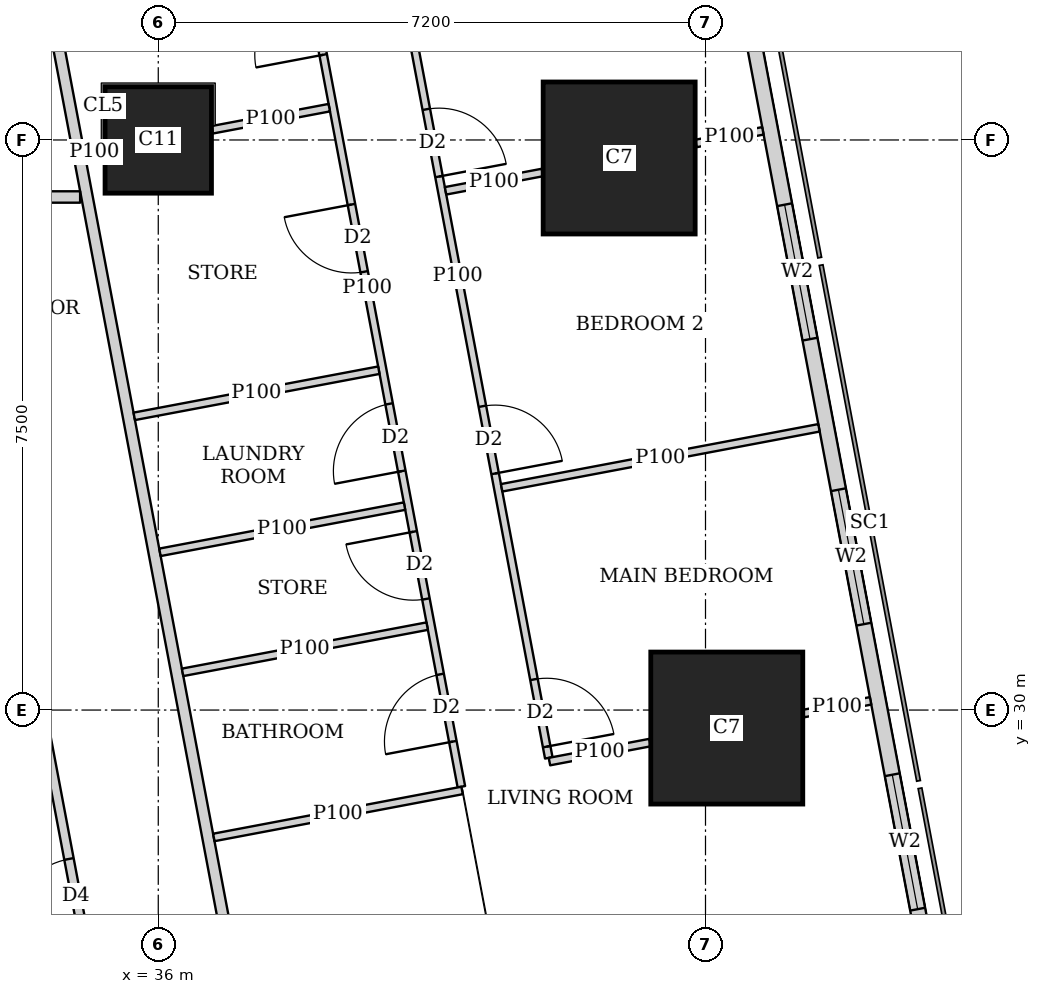
"""IFC4 building model, lengths in metres.
Left out: names, types, materials, properties, quantities, classifications, styles, units other than length and angle.
Written with IfcOpenShell. Run it as: python <this file> out.ifc"""

import sys

from ifc_helpers import new_model, si_unit, direction, frame, frame_2d, origin, origin_2d, place, context, subcontext, project, spatial, rectangle, extrude, element, fill, save


model = new_model("IFC4")
c1 = context("Model", 3, precision=1e-05, world=origin(), true_north=direction((0.0, 1.0)))
c2 = subcontext(c1, "Body", "Model", "MODEL_VIEW")
j1 = project(units=[si_unit("LENGTHUNIT", "METRE"), si_unit("PLANEANGLEUNIT", "RADIAN")], contexts=[c1])
p1 = place(None, origin())
s1 = spatial("IfcSite", under=j1, at=p1, CompositionType="ELEMENT")
p2 = place(p1, origin())
s2 = spatial("IfcBuilding", under=s1, at=p2, CompositionType="ELEMENT")
p3 = place(p2, frame((0.0, 0.0, 270.35)))
s3 = spatial("IfcBuildingStorey", under=s2, at=p3, CompositionType="ELEMENT", Elevation=270.35)
p4 = place(p3, frame((43.48, 29.763, 0.0), z_axis=(0.0, 0.0, 1.0), x_axis=(1.0, 0.0, 0.0)))
e1 = element("IfcColumn", 1, at=p4, inside=s3, PredefinedType="COLUMN", context=c2, shape_type="SweptSolid", body=[
    extrude(rectangle(XDim=2.0, YDim=2.0, at=origin_2d()), origin(), (0.0, 0.0, 1.0), 3.75),
])
p5 = place(p3, frame((36.0, 37.5, 0.0), z_axis=(0.0, 0.0, 1.0), x_axis=(1.0, 0.0, 0.0)))
e2 = element("IfcColumn", 2, at=p5, inside=s3, PredefinedType="COLUMN", context=c2, shape_type="SweptSolid", body=[
    extrude(rectangle(XDim=1.4, YDim=1.4, at=origin_2d()), origin(), (0.0, 0.0, 1.0), 3.75),
])
p6 = place(p3, frame((42.064, 37.263, 0.0), z_axis=(0.0, 0.0, 1.0), x_axis=(1.0, 0.0, 0.0)))
e3 = element("IfcColumn", 3, at=p6, inside=s3, PredefinedType="COLUMN", context=c2, shape_type="SweptSolid", body=[
    extrude(rectangle(XDim=2.0, YDim=2.0, at=origin_2d()), origin(), (0.0, 0.0, 1.0), 3.75),
])
p7 = place(p3, frame((49.684, 7.832, 0.0), z_axis=(0.0, 0.0, 1.0), x_axis=(-0.185616669694, 0.982622232565, 0.0)))
e4 = element("IfcWall", 4, at=p7, inside=s3, PredefinedType="SOLIDWALL", context=c2, shape_type="SweptSolid", body=[
    extrude(rectangle(XDim=36.0, YDim=0.2, at=frame_2d((18.0, 0.0))), origin(), (0.0, 0.0, 1.0), 3.5),
])
p8 = place(p7, frame((2.518, 0.0, 0.9)))
e5 = element("IfcOpeningElement", 5, at=p8, cuts=e4, PredefinedType="OPENING", context=c2, shape_type="SweptSolid", body=[
    extrude(rectangle(XDim=2.4, YDim=1.5, at=frame_2d((1.2, 0.75))), frame((0.0, 0.11, 0.0), z_axis=(0.0, -1.0, 0.0), x_axis=(1.0, 0.0, 0.0)), (0.0, 0.0, 1.0), 0.22),
])
p9 = place(p7, frame((8.444, 0.0, 0.9)))
e6 = element("IfcOpeningElement", 6, at=p9, cuts=e4, PredefinedType="OPENING", context=c2, shape_type="SweptSolid", body=[
    extrude(rectangle(XDim=1.8, YDim=1.5, at=frame_2d((0.9, 0.75))), frame((0.0, 0.11, 0.0), z_axis=(0.0, -1.0, 0.0), x_axis=(1.0, 0.0, 0.0)), (0.0, 0.0, 1.0), 0.22),
])
p10 = place(p7, frame((12.261, 0.0, 0.9)))
e7 = element("IfcOpeningElement", 7, at=p10, cuts=e4, PredefinedType="OPENING", context=c2, shape_type="SweptSolid", body=[
    extrude(rectangle(XDim=1.8, YDim=1.5, at=frame_2d((0.9, 0.75))), frame((0.0, 0.11, 0.0), z_axis=(0.0, -1.0, 0.0), x_axis=(1.0, 0.0, 0.0)), (0.0, 0.0, 1.0), 0.22),
])
p11 = place(p7, frame((16.078, 0.0, 0.9)))
e8 = element("IfcOpeningElement", 8, at=p11, cuts=e4, PredefinedType="OPENING", context=c2, shape_type="SweptSolid", body=[
    extrude(rectangle(XDim=1.8, YDim=1.5, at=frame_2d((0.9, 0.75))), frame((0.0, 0.11, 0.0), z_axis=(0.0, -1.0, 0.0), x_axis=(1.0, 0.0, 0.0)), (0.0, 0.0, 1.0), 0.22),
])
p12 = place(p7, frame((19.894, 0.0, 0.9)))
e9 = element("IfcOpeningElement", 9, at=p12, cuts=e4, PredefinedType="OPENING", context=c2, shape_type="SweptSolid", body=[
    extrude(rectangle(XDim=1.8, YDim=1.5, at=frame_2d((0.9, 0.75))), frame((0.0, 0.11, 0.0), z_axis=(0.0, -1.0, 0.0), x_axis=(1.0, 0.0, 0.0)), (0.0, 0.0, 1.0), 0.22),
])
p13 = place(p7, frame((23.71, 0.0, 0.9)))
e10 = element("IfcOpeningElement", 10, at=p13, cuts=e4, PredefinedType="OPENING", context=c2, shape_type="SweptSolid", body=[
    extrude(rectangle(XDim=1.8, YDim=1.5, at=frame_2d((0.9, 0.75))), frame((0.0, 0.11, 0.0), z_axis=(0.0, -1.0, 0.0), x_axis=(1.0, 0.0, 0.0)), (0.0, 0.0, 1.0), 0.22),
])
p14 = place(p7, frame((27.526, 0.0, 0.9)))
e11 = element("IfcOpeningElement", 11, at=p14, cuts=e4, PredefinedType="OPENING", context=c2, shape_type="SweptSolid", body=[
    extrude(rectangle(XDim=1.8, YDim=1.5, at=frame_2d((0.9, 0.75))), frame((0.0, 0.11, 0.0), z_axis=(0.0, -1.0, 0.0), x_axis=(1.0, 0.0, 0.0)), (0.0, 0.0, 1.0), 0.22),
])
p15 = place(p7, frame((32.046, 0.0, 0.9)))
e12 = element("IfcOpeningElement", 12, at=p15, cuts=e4, PredefinedType="OPENING", context=c2, shape_type="SweptSolid", body=[
    extrude(rectangle(XDim=1.8, YDim=1.5, at=frame_2d((0.9, 0.75))), frame((0.0, 0.11, 0.0), z_axis=(0.0, -1.0, 0.0), x_axis=(1.0, 0.0, 0.0)), (0.0, 0.0, 1.0), 0.22),
])
p16 = place(p3, frame((29.501, 36.75, 0.0), z_axis=(0.0, 0.0, 1.0), x_axis=(1.0, 0.0, 0.0)))
e13 = element("IfcWall", 13, at=p16, inside=s3, PredefinedType="SOLIDWALL", context=c2, shape_type="SweptSolid", body=[
    extrude(rectangle(XDim=5.471, YDim=0.15, at=frame_2d((2.735, 0.0))), origin(), (0.0, 0.0, 1.0), 3.5),
])
p17 = place(p3, frame((34.036, 42.186, 0.0), z_axis=(0.0, 0.0, 1.0), x_axis=(0.185593518645, -0.9826266055, 0.0)))
e14 = element("IfcWall", 14, at=p17, inside=s3, PredefinedType="SOLIDWALL", context=c2, shape_type="SweptSolid", body=[
    extrude(rectangle(XDim=35.961, YDim=0.15, at=frame_2d((17.98, 0.0))), origin(), (0.0, 0.0, 1.0), 2.5),
])
p18 = place(p17, frame((15.529, 0.0, 0.0)))
e15 = element("IfcOpeningElement", 15, at=p18, cuts=e14, PredefinedType="OPENING", context=c2, shape_type="SweptSolid", body=[
    extrude(rectangle(XDim=1.0, YDim=2.1, at=frame_2d((0.5, 1.05))), frame((0.0, 0.085, 0.0), z_axis=(0.0, -1.0, 0.0), x_axis=(1.0, 0.0, 0.0)), (0.0, 0.0, 1.0), 0.17),
])
p19 = place(p17, frame((19.345, 0.0, 0.0)))
e16 = element("IfcOpeningElement", 16, at=p19, cuts=e14, PredefinedType="OPENING", context=c2, shape_type="SweptSolid", body=[
    extrude(rectangle(XDim=1.0, YDim=2.1, at=frame_2d((0.5, 1.05))), frame((0.0, 0.085, 0.0), z_axis=(0.0, -1.0, 0.0), x_axis=(1.0, 0.0, 0.0)), (0.0, 0.0, 1.0), 0.17),
])
p20 = place(p17, frame((30.594, 0.0, 0.0)))
e17 = element("IfcOpeningElement", 17, at=p20, cuts=e14, PredefinedType="OPENING", context=c2, shape_type="SweptSolid", body=[
    extrude(rectangle(XDim=1.0, YDim=2.1, at=frame_2d((0.5, 1.05))), frame((0.0, 0.085, 0.0), z_axis=(0.0, -1.0, 0.0), x_axis=(1.0, 0.0, 0.0)), (0.0, 0.0, 1.0), 0.17),
])
p21 = place(p3, frame((38.744, 42.045, 0.0), z_axis=(0.0, 0.0, 1.0), x_axis=(0.185614085367, -0.982622720739, 0.0)))
e18 = element("IfcWall", 18, at=p21, inside=s3, PredefinedType="PARTITIONING", context=c2, shape_type="SweptSolid", body=[
    extrude(rectangle(XDim=12.898, YDim=0.1, at=frame_2d((6.449, 0.0))), origin(), (0.0, 0.0, 1.0), 2.5),
])
p22 = place(p21, frame((11.848, 0.0, 0.0)))
e19 = element("IfcOpeningElement", 19, at=p22, cuts=e18, PredefinedType="OPENING", context=c2, shape_type="SweptSolid", body=[
    extrude(rectangle(XDim=0.9, YDim=2.1, at=frame_2d((0.45, 1.05))), frame((0.0, 0.06, 0.0), z_axis=(0.0, -1.0, 0.0), x_axis=(1.0, 0.0, 0.0)), (0.0, 0.0, 1.0), 0.12),
])
p23 = place(p21, frame((8.191, 0.0, 0.0)))
e20 = element("IfcOpeningElement", 20, at=p23, cuts=e18, PredefinedType="OPENING", context=c2, shape_type="SweptSolid", body=[
    extrude(rectangle(XDim=0.9, YDim=2.1, at=frame_2d((0.45, 1.05))), frame((0.0, 0.06, 0.0), z_axis=(0.0, -1.0, 0.0), x_axis=(1.0, 0.0, 0.0)), (0.0, 0.0, 1.0), 0.12),
])
p24 = place(p21, frame((4.215, 0.0, 0.0)))
e21 = element("IfcOpeningElement", 21, at=p24, cuts=e18, PredefinedType="OPENING", context=c2, shape_type="SweptSolid", body=[
    extrude(rectangle(XDim=0.9, YDim=2.1, at=frame_2d((0.45, 1.05))), frame((0.0, 0.06, 0.0), z_axis=(0.0, -1.0, 0.0), x_axis=(1.0, 0.0, 0.0)), (0.0, 0.0, 1.0), 0.12),
])
p25 = place(p3, frame((37.511, 42.109, 0.0), z_axis=(0.0, 0.0, 1.0), x_axis=(0.185550464988, -0.982634736279, 0.0)))
e22 = element("IfcWall", 22, at=p25, inside=s3, PredefinedType="PARTITIONING", context=c2, shape_type="SweptSolid", body=[
    extrude(rectangle(XDim=13.35, YDim=0.1, at=frame_2d((6.675, 0.0))), origin(), (0.0, 0.0, 1.0), 2.5),
])
p26 = place(p25, frame((11.845, 0.0, 0.0)))
e23 = element("IfcOpeningElement", 23, at=p26, cuts=e22, PredefinedType="OPENING", context=c2, shape_type="SweptSolid", body=[
    extrude(rectangle(XDim=0.9, YDim=2.1, at=frame_2d((0.45, 1.05))), frame((0.0, 0.06, 0.0), z_axis=(0.0, -1.0, 0.0), x_axis=(1.0, 0.0, 0.0)), (0.0, 0.0, 1.0), 0.12),
])
p27 = place(p25, frame((8.224, 0.0, 0.0)))
e24 = element("IfcOpeningElement", 24, at=p27, cuts=e22, PredefinedType="OPENING", context=c2, shape_type="SweptSolid", body=[
    extrude(rectangle(XDim=0.9, YDim=2.1, at=frame_2d((0.45, 1.05))), frame((0.0, 0.06, 0.0), z_axis=(0.0, -1.0, 0.0), x_axis=(1.0, 0.0, 0.0)), (0.0, 0.0, 1.0), 0.12),
])
p28 = place(p25, frame((2.65, 0.0, 0.0)))
e25 = element("IfcOpeningElement", 25, at=p28, cuts=e22, PredefinedType="OPENING", context=c2, shape_type="SweptSolid", body=[
    extrude(rectangle(XDim=0.9, YDim=2.1, at=frame_2d((0.45, 1.05))), frame((0.0, 0.06, 0.0), z_axis=(0.0, -1.0, 0.0), x_axis=(1.0, 0.0, 0.0)), (0.0, 0.0, 1.0), 0.12),
])
p29 = place(p25, frame((9.936, 0.0, 0.0)))
e26 = element("IfcOpeningElement", 26, at=p29, cuts=e22, PredefinedType="OPENING", context=c2, shape_type="SweptSolid", body=[
    extrude(rectangle(XDim=0.9, YDim=2.1, at=frame_2d((0.45, 1.05))), frame((0.0, 0.06, 0.0), z_axis=(0.0, -1.0, 0.0), x_axis=(1.0, 0.0, 0.0)), (0.0, 0.0, 1.0), 0.12),
])
p30 = place(p25, frame((5.555, 0.0, 0.0)))
e27 = element("IfcOpeningElement", 27, at=p30, cuts=e22, PredefinedType="OPENING", context=c2, shape_type="SweptSolid", body=[
    extrude(rectangle(XDim=0.9, YDim=2.1, at=frame_2d((0.45, 1.05))), frame((0.0, 0.06, 0.0), z_axis=(0.0, -1.0, 0.0), x_axis=(1.0, 0.0, 0.0)), (0.0, 0.0, 1.0), 0.12),
])
p31 = place(p3, frame((43.955, 37.62, 0.0), z_axis=(0.0, 0.0, 1.0), x_axis=(-0.982708424405, -0.18515980288, 0.0)))
e28 = element("IfcWall", 28, at=p31, inside=s3, PredefinedType="PARTITIONING", context=c2, shape_type="SweptSolid", body=[
    extrude(rectangle(XDim=0.897, YDim=0.1, at=frame_2d((0.448, 0.0))), origin(), (0.0, 0.0, 1.0), 3.5),
])
p32 = place(p3, frame((41.054, 37.072, 0.0), z_axis=(0.0, 0.0, 1.0), x_axis=(-0.982576752117, -0.185857273733, 0.0)))
e29 = element("IfcWall", 29, at=p32, inside=s3, PredefinedType="PARTITIONING", context=c2, shape_type="SweptSolid", body=[
    extrude(rectangle(XDim=1.297, YDim=0.1, at=frame_2d((0.648, 0.0))), origin(), (0.0, 0.0, 1.0), 3.5),
])
p33 = place(p3, frame((44.693, 33.713, 0.0), z_axis=(0.0, 0.0, 1.0), x_axis=(-0.982615600536, -0.185651775062, 0.0)))
e30 = element("IfcWall", 30, at=p33, inside=s3, PredefinedType="PARTITIONING", context=c2, shape_type="SweptSolid", body=[
    extrude(rectangle(XDim=4.249, YDim=0.1, at=frame_2d((2.125, 0.0))), origin(), (0.0, 0.0, 1.0), 2.5),
])
p34 = place(p3, frame((45.372, 30.121, 0.0), z_axis=(0.0, 0.0, 1.0), x_axis=(-0.982547416156, -0.186012297994, 0.0)))
e31 = element("IfcWall", 31, at=p34, inside=s3, PredefinedType="PARTITIONING", context=c2, shape_type="SweptSolid", body=[
    extrude(rectangle(XDim=0.898, YDim=0.1, at=frame_2d((0.449, 0.0))), origin(), (0.0, 0.0, 1.0), 3.5),
])
p35 = place(p3, frame((42.47, 29.572, 0.0), z_axis=(0.0, 0.0, 1.0), x_axis=(-0.982610503289, -0.185678751683, 0.0)))
e32 = element("IfcWall", 32, at=p35, inside=s3, PredefinedType="PARTITIONING", context=c2, shape_type="SweptSolid", body=[
    extrude(rectangle(XDim=1.346, YDim=0.1, at=frame_2d((0.673, 0.0))), origin(), (0.0, 0.0, 1.0), 2.5),
])
p36 = place(p3, frame((38.25, 37.925, 0.0), z_axis=(0.0, 0.0, 1.0), x_axis=(-0.982610209589, -0.185680305934, 0.0)))
e33 = element("IfcWall", 33, at=p36, inside=s3, PredefinedType="PARTITIONING", context=c2, shape_type="SweptSolid", body=[
    extrude(rectangle(XDim=1.567, YDim=0.1, at=frame_2d((0.784, 0.0))), origin(), (0.0, 0.0, 1.0), 3.5),
])
p37 = place(p3, frame((35.29, 37.366, 0.0), z_axis=(0.0, 0.0, 1.0), x_axis=(-0.982395465615, -0.18681313963, 0.0)))
e34 = element("IfcWall", 34, at=p37, inside=s3, PredefinedType="PARTITIONING", context=c2, shape_type="SweptSolid", body=[
    extrude(rectangle(XDim=0.263, YDim=0.1, at=frame_2d((0.131, 0.0))), origin(), (0.0, 0.0, 1.0), 3.5),
])
p38 = place(p3, frame((39.24, 32.683, 0.0), z_axis=(0.0, 0.0, 1.0), x_axis=(-0.982607026909, -0.185697147715, 0.0)))
e35 = element("IfcWall", 35, at=p38, inside=s3, PredefinedType="PARTITIONING", context=c2, shape_type="SweptSolid", body=[
    extrude(rectangle(XDim=3.275, YDim=0.1, at=frame_2d((1.637, 0.0))), origin(), (0.0, 0.0, 1.0), 3.5),
])
p39 = place(p3, frame((39.997, 28.942, 0.0), z_axis=(0.0, 0.0, 1.0), x_axis=(-0.982569883123, -0.185893584556, 0.0)))
e36 = element("IfcWall", 36, at=p39, inside=s3, PredefinedType="PARTITIONING", context=c2, shape_type="SweptSolid", body=[
    extrude(rectangle(XDim=3.324, YDim=0.1, at=frame_2d((1.662, 0.0))), origin(), (0.0, 0.0, 1.0), 3.5),
])
p40 = place(p3, frame((39.538, 31.104, 0.0), z_axis=(0.0, 0.0, 1.0), x_axis=(-0.982620626894, -0.185625169636, 0.0)))
e37 = element("IfcWall", 37, at=p40, inside=s3, PredefinedType="PARTITIONING", context=c2, shape_type="SweptSolid", body=[
    extrude(rectangle(XDim=3.275, YDim=0.1, at=frame_2d((1.637, 0.0))), origin(), (0.0, 0.0, 1.0), 2.5),
])
p41 = place(p3, frame((38.902, 34.471, 0.0), z_axis=(0.0, 0.0, 1.0), x_axis=(-0.982674977865, -0.185337227447, 0.0)))
e38 = element("IfcWall", 38, at=p41, inside=s3, PredefinedType="PARTITIONING", context=c2, shape_type="SweptSolid", body=[
    extrude(rectangle(XDim=3.275, YDim=0.1, at=frame_2d((1.637, 0.0))), origin(), (0.0, 0.0, 1.0), 3.5),
])
p42 = place(p3, frame((38.202, 10.163, 0.0), z_axis=(0.0, 0.0, 1.0), x_axis=(-0.185610321132, 0.982623431783, 0.0)))
e39 = element("IfcWall", 39, at=p42, inside=s3, PredefinedType="PARTITIONING", context=c2, shape_type="SweptSolid", body=[
    extrude(rectangle(XDim=25.111, YDim=0.125, at=frame_2d((12.556, 0.0))), origin(), (0.0, 0.0, 1.0), 2.5),
])
p43 = place(p42, frame((0.708, 0.0, 0.0)))
e40 = element("IfcOpeningElement", 40, at=p43, cuts=e39, PredefinedType="OPENING", context=c2, shape_type="SweptSolid", body=[
    extrude(rectangle(XDim=1.0, YDim=2.1, at=frame_2d((0.5, 1.05))), frame((0.0, 0.073, 0.0), z_axis=(0.0, -1.0, 0.0), x_axis=(1.0, 0.0, 0.0)), (0.0, 0.0, 1.0), 0.145),
])
p44 = place(p42, frame((5.9, 0.0, 0.0)))
e41 = element("IfcOpeningElement", 41, at=p44, cuts=e39, PredefinedType="OPENING", context=c2, shape_type="SweptSolid", body=[
    extrude(rectangle(XDim=1.0, YDim=2.1, at=frame_2d((0.5, 1.05))), frame((0.0, 0.073, 0.0), z_axis=(0.0, -1.0, 0.0), x_axis=(1.0, 0.0, 0.0)), (0.0, 0.0, 1.0), 0.145),
])
p45 = place(p42, frame((13.378, 0.0, 0.0)))
e42 = element("IfcOpeningElement", 42, at=p45, cuts=e39, PredefinedType="OPENING", context=c2, shape_type="SweptSolid", body=[
    extrude(rectangle(XDim=1.0, YDim=2.1, at=frame_2d((0.5, 1.05))), frame((0.0, 0.073, 0.0), z_axis=(0.0, -1.0, 0.0), x_axis=(1.0, 0.0, 0.0)), (0.0, 0.0, 1.0), 0.145),
])
p46 = place(p42, frame((17.194, 0.0, 0.0)))
e43 = element("IfcOpeningElement", 43, at=p46, cuts=e39, PredefinedType="OPENING", context=c2, shape_type="SweptSolid", body=[
    extrude(rectangle(XDim=1.0, YDim=2.1, at=frame_2d((0.5, 1.05))), frame((0.0, 0.073, 0.0), z_axis=(0.0, -1.0, 0.0), x_axis=(1.0, 0.0, 0.0)), (0.0, 0.0, 1.0), 0.145),
])
p47 = place(p42, frame((21.15, 0.0, 0.0)))
e44 = element("IfcOpeningElement", 44, at=p47, cuts=e39, PredefinedType="OPENING", context=c2, shape_type="SweptSolid", body=[
    extrude(rectangle(XDim=1.0, YDim=2.1, at=frame_2d((0.5, 1.05))), frame((0.0, 0.073, 0.0), z_axis=(0.0, -1.0, 0.0), x_axis=(1.0, 0.0, 0.0)), (0.0, 0.0, 1.0), 0.145),
])
p48 = place(p12, origin())
e45 = element("IfcWindow", 45, at=p48, inside=s3, PartitioningType="SINGLE_PANEL", PredefinedType="WINDOW", context=c2, shape_type="SweptSolid", body=[
    extrude(rectangle(XDim=1.8, YDim=1.5, at=frame_2d((0.9, 0.75))), frame((0.0, 0.03, 0.0), z_axis=(0.0, -1.0, 0.0), x_axis=(1.0, 0.0, 0.0)), (0.0, 0.0, 1.0), 0.06),
])
fill(e9, e45)
p49 = place(p13, origin())
e46 = element("IfcWindow", 46, at=p49, inside=s3, PartitioningType="SINGLE_PANEL", PredefinedType="WINDOW", context=c2, shape_type="SweptSolid", body=[
    extrude(rectangle(XDim=1.8, YDim=1.5, at=frame_2d((0.9, 0.75))), frame((0.0, 0.03, 0.0), z_axis=(0.0, -1.0, 0.0), x_axis=(1.0, 0.0, 0.0)), (0.0, 0.0, 1.0), 0.06),
])
fill(e10, e46)
p50 = place(p14, origin())
e47 = element("IfcWindow", 47, at=p50, inside=s3, PartitioningType="SINGLE_PANEL", PredefinedType="WINDOW", context=c2, shape_type="SweptSolid", body=[
    extrude(rectangle(XDim=1.8, YDim=1.5, at=frame_2d((0.9, 0.75))), frame((0.0, 0.03, 0.0), z_axis=(0.0, -1.0, 0.0), x_axis=(1.0, 0.0, 0.0)), (0.0, 0.0, 1.0), 0.06),
])
fill(e11, e47)
p51 = place(p22, origin())
e48 = element("IfcDoor", 48, at=p51, inside=s3, OperationType="SINGLE_SWING_RIGHT", PredefinedType="DOOR", context=c2, shape_type="SweptSolid", body=[
    extrude(rectangle(XDim=0.9, YDim=2.1, at=frame_2d((0.45, 1.05))), frame((0.0, 0.025, 0.0), z_axis=(0.0, -1.0, 0.0), x_axis=(1.0, 0.0, 0.0)), (0.0, 0.0, 1.0), 0.05),
])
fill(e19, e48)
p52 = place(p23, origin())
e49 = element("IfcDoor", 49, at=p52, inside=s3, OperationType="SINGLE_SWING_RIGHT", PredefinedType="DOOR", context=c2, shape_type="SweptSolid", body=[
    extrude(rectangle(XDim=0.9, YDim=2.1, at=frame_2d((0.45, 1.05))), frame((0.0, 0.025, 0.0), z_axis=(0.0, -1.0, 0.0), x_axis=(1.0, 0.0, 0.0)), (0.0, 0.0, 1.0), 0.05),
])
fill(e20, e49)
p53 = place(p24, origin())
e50 = element("IfcDoor", 50, at=p53, inside=s3, OperationType="SINGLE_SWING_RIGHT", PredefinedType="DOOR", context=c2, shape_type="SweptSolid", body=[
    extrude(rectangle(XDim=0.9, YDim=2.1, at=frame_2d((0.45, 1.05))), frame((0.0, 0.025, 0.0), z_axis=(0.0, -1.0, 0.0), x_axis=(1.0, 0.0, 0.0)), (0.0, 0.0, 1.0), 0.05),
])
fill(e21, e50)
p54 = place(p26, origin())
e51 = element("IfcDoor", 51, at=p54, inside=s3, OperationType="SINGLE_SWING_LEFT", PredefinedType="DOOR", context=c2, shape_type="SweptSolid", body=[
    extrude(rectangle(XDim=0.9, YDim=2.1, at=frame_2d((0.45, 1.05))), frame((0.0, 0.025, 0.0), z_axis=(0.0, -1.0, 0.0), x_axis=(1.0, 0.0, 0.0)), (0.0, 0.0, 1.0), 0.05),
])
fill(e23, e51)
p55 = place(p27, origin())
e52 = element("IfcDoor", 52, at=p55, inside=s3, OperationType="SINGLE_SWING_LEFT", PredefinedType="DOOR", context=c2, shape_type="SweptSolid", body=[
    extrude(rectangle(XDim=0.9, YDim=2.1, at=frame_2d((0.45, 1.05))), frame((0.0, 0.025, 0.0), z_axis=(0.0, -1.0, 0.0), x_axis=(1.0, 0.0, 0.0)), (0.0, 0.0, 1.0), 0.05),
])
fill(e24, e52)
p56 = place(p28, origin())
e53 = element("IfcDoor", 53, at=p56, inside=s3, OperationType="SINGLE_SWING_LEFT", PredefinedType="DOOR", context=c2, shape_type="SweptSolid", body=[
    extrude(rectangle(XDim=0.9, YDim=2.1, at=frame_2d((0.45, 1.05))), frame((0.0, 0.025, 0.0), z_axis=(0.0, -1.0, 0.0), x_axis=(1.0, 0.0, 0.0)), (0.0, 0.0, 1.0), 0.05),
])
fill(e25, e53)
p57 = place(p29, origin())
e54 = element("IfcDoor", 54, at=p57, inside=s3, OperationType="SINGLE_SWING_RIGHT", PredefinedType="DOOR", context=c2, shape_type="SweptSolid", body=[
    extrude(rectangle(XDim=0.9, YDim=2.1, at=frame_2d((0.45, 1.05))), frame((0.0, 0.025, 0.0), z_axis=(0.0, -1.0, 0.0), x_axis=(1.0, 0.0, 0.0)), (0.0, 0.0, 1.0), 0.05),
])
fill(e26, e54)
p58 = place(p30, origin())
e55 = element("IfcDoor", 55, at=p58, inside=s3, OperationType="SINGLE_SWING_RIGHT", PredefinedType="DOOR", context=c2, shape_type="SweptSolid", body=[
    extrude(rectangle(XDim=0.9, YDim=2.1, at=frame_2d((0.45, 1.05))), frame((0.0, 0.025, 0.0), z_axis=(0.0, -1.0, 0.0), x_axis=(1.0, 0.0, 0.0)), (0.0, 0.0, 1.0), 0.05),
])
fill(e27, e55)
p59 = place(p46, origin())
e56 = element("IfcDoor", 56, at=p59, inside=s3, OperationType="SINGLE_SWING_LEFT", PredefinedType="DOOR", context=c2, shape_type="SweptSolid", body=[
    extrude(rectangle(XDim=1.0, YDim=2.1, at=frame_2d((0.5, 1.05))), frame((0.0, 0.025, 0.0), z_axis=(0.0, -1.0, 0.0), x_axis=(1.0, 0.0, 0.0)), (0.0, 0.0, 1.0), 0.05),
])
fill(e43, e56)
save(model, sys.argv[1])
